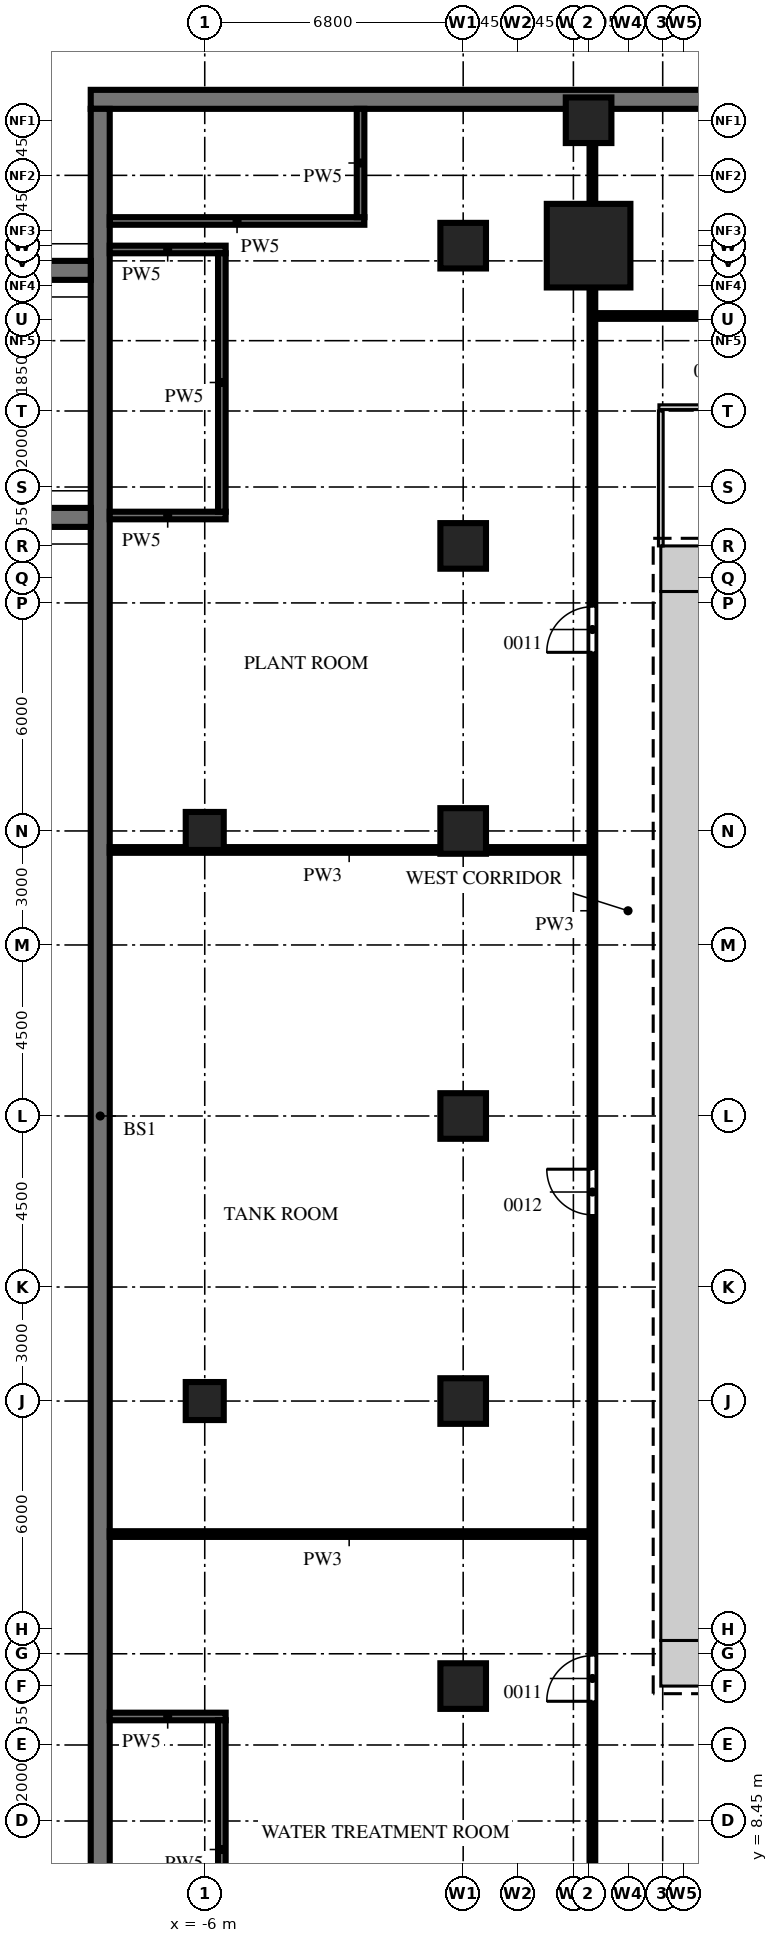
"""IFC4 building model, lengths in metres.
Left out: names, types, materials, properties, quantities, classifications, styles, units other than length and angle.
Written with IfcOpenShell. Run it as: python <this file> out.ifc"""

import sys

from ifc_helpers import new_model, si_unit, direction, frame, frame_2d, origin, origin_2d, place, context, subcontext, project, spatial, rectangle, extrude, source, transform, mapped, element, fill, save


model = new_model("IFC4")
c1 = context("Model", 3, precision=1e-05, world=origin(), true_north=direction((0.0, 1.0)))
c2 = subcontext(c1, "Body", "Model", "MODEL_VIEW")
j1 = project(units=[si_unit("LENGTHUNIT", "METRE"), si_unit("PLANEANGLEUNIT", "RADIAN")], contexts=[c1])
p1 = place(None, origin())
s1 = spatial("IfcSite", under=j1, at=p1, CompositionType="ELEMENT")
p2 = place(p1, origin())
s2 = spatial("IfcBuilding", under=s1, at=p2, CompositionType="ELEMENT")
p3 = place(p2, frame((0.0, 0.0, -9.0)))
s3 = spatial("IfcBuildingStorey", under=s2, at=p3, CompositionType="ELEMENT", Elevation=-9.0)
m1 = source(origin(), c2, "Body", "SweptSolid", [
    extrude(rectangle(XDim=1.2, YDim=1.2, at=frame_2d((0.6, 0.0))), origin(), (0.0, 0.0, 1.0), 4.2),
])
for number, where, z_axis, x_axis in (
    (1, (6.0, 41.4, 0.0), (0.0, 0.0, 1.0), (1.0, 0.0, 0.0)),
    (2, (6.0, 12.6, 0.0), (0.0, 0.0, 1.0), (1.0, 0.0, 0.0)),
):
    element("IfcWall", number, at=place(p3, frame(where, z_axis=z_axis, x_axis=x_axis)), inside=s3, PredefinedType="SHEAR", context=c2, shape_type="MappedRepresentation", body=[
        mapped(m1, transform((0.0, 0.0, 0.0))),
    ])
m2 = source(origin(), c2, "Body", "SweptSolid", [
    extrude(rectangle(XDim=27.6, YDim=1.2, at=frame_2d((13.8, 0.0))), origin(), (0.0, 0.0, 1.0), 4.2),
])
p4 = place(p3, frame((6.6, 13.2, 0.0), z_axis=(0.0, 0.0, 1.0), x_axis=(0.0, 1.0, 0.0)))
e3 = element("IfcWall", 3, at=p4, inside=s3, PredefinedType="SHEAR", context=c2, shape_type="MappedRepresentation", body=[
    mapped(m2, transform((0.0, 0.0, 0.0))),
])
m3 = source(origin(), c2, "Body", "SweptSolid", [
    extrude(rectangle(XDim=90.0, YDim=0.5, at=frame_2d((45.0, 0.0))), origin(), (0.0, 0.0, 1.0), 4.2),
])
p5 = place(p3, frame((-9.0, 53.75, 0.0), z_axis=(0.0, 0.0, 1.0), x_axis=(1.0, 0.0, 0.0)))
e4 = element("IfcWall", 4, at=p5, inside=s3, PredefinedType="STANDARD", context=c2, shape_type="MappedRepresentation", body=[
    mapped(m3, transform((0.0, 0.0, 0.0))),
])
m4 = source(origin(), c2, "Body", "SweptSolid", [
    extrude(rectangle(XDim=53.0, YDim=0.5, at=frame_2d((26.5, 0.0))), origin(), (0.0, 0.0, 1.0), 4.2),
])
p6 = place(p3, frame((-8.75, 0.5, 0.0), z_axis=(0.0, 0.0, 1.0), x_axis=(0.0, 1.0, 0.0)))
e5 = element("IfcWall", 5, at=p6, inside=s3, PredefinedType="STANDARD", context=c2, shape_type="MappedRepresentation", body=[
    mapped(m4, transform((0.0, 0.0, 0.0))),
])
m5 = source(origin(), c2, "Body", "SweptSolid", [
    extrude(rectangle(XDim=2.2, YDim=2.2, at=origin_2d()), origin(), (0.0, 0.0, 1.0), 4.5),
])
p7 = place(p3, frame((4.1, 49.9, 0.0), z_axis=(0.0, 0.0, 1.0), x_axis=(1.0, 0.0, 0.0)))
e6 = element("IfcColumn", 6, at=p7, inside=s3, PredefinedType="COLUMN", context=c2, shape_type="MappedRepresentation", body=[
    mapped(m5, transform((0.0, 0.0, 0.0))),
])
m6 = source(origin(), c2, "Body", "SweptSolid", [
    extrude(rectangle(XDim=1.2, YDim=1.2, at=origin_2d()), origin(), (0.0, 0.0, 1.0), 4.2),
])
for number, where, z_axis, x_axis in (
    (7, (4.1, 53.2, 0.0), (0.0, 0.0, 1.0), (1.0, 0.0, 0.0)),
    (8, (0.8, 12.0, 0.0), (0.0, 0.0, 1.0), (1.0, 0.0, 0.0)),
    (9, (0.8, 19.5, 0.0), (0.0, 0.0, 1.0), (1.0, 0.0, 0.0)),
    (10, (0.8, 27.0, 0.0), (0.0, 0.0, 1.0), (1.0, 0.0, 0.0)),
    (11, (0.8, 34.5, 0.0), (0.0, 0.0, 1.0), (1.0, 0.0, 0.0)),
    (12, (0.8, 42.0, 0.0), (0.0, 0.0, 1.0), (1.0, 0.0, 0.0)),
    (13, (0.8, 49.9, 0.0), (0.0, 0.0, 1.0), (1.0, 0.0, 0.0)),
):
    element("IfcColumn", number, at=place(p3, frame(where, z_axis=z_axis, x_axis=x_axis)), inside=s3, PredefinedType="COLUMN", context=c2, shape_type="MappedRepresentation", body=[
        mapped(m6, transform((0.0, 0.0, 0.0))),
    ])
m7 = source(origin(), c2, "Body", "SweptSolid", [
    extrude(rectangle(XDim=1.0, YDim=1.0, at=origin_2d()), origin(), (0.0, 0.0, 1.0), 4.2),
])
for number, where, z_axis, x_axis in (
    (14, (-6.0, 19.5, 0.0), (0.0, 0.0, 1.0), (1.0, 0.0, 0.0)),
    (15, (-6.0, 34.5, 0.0), (0.0, 0.0, 1.0), (1.0, 0.0, 0.0)),
):
    element("IfcColumn", number, at=place(p3, frame(where, z_axis=z_axis, x_axis=x_axis)), inside=s3, PredefinedType="COLUMN", context=c2, shape_type="MappedRepresentation", body=[
        mapped(m7, transform((0.0, 0.0, 0.0))),
    ])
m8 = source(origin(), c2, "Body", "SweptSolid", [
    extrude(rectangle(XDim=29.995, YDim=0.5, at=frame_2d((14.997, 0.0))), origin(), (0.0, 0.0, 1.0), 0.36),
])
for number, where, z_axis, x_axis in (
    (16, (-38.995, 42.75, 4.14), (0.0, 0.0, 1.0), (1.0, 0.0, 0.0)),
    (17, (-38.995, 49.25, 4.14), (0.0, 0.0, 1.0), (1.0, 0.0, 0.0)),
):
    element("IfcWall", number, at=place(p3, frame(where, z_axis=z_axis, x_axis=x_axis)), inside=s3, PredefinedType="SOLIDWALL", context=c2, shape_type="MappedRepresentation", body=[
        mapped(m8, transform((0.0, 0.0, 0.0))),
    ])
m9 = source(origin(), c2, "Body", "SweptSolid", [
    extrude(rectangle(XDim=53.0, YDim=0.15, at=frame_2d((26.5, 0.0))), origin(), (0.0, 0.0, 1.0), 4.2),
])
p8 = place(p3, frame((4.2, 0.5, 0.0), z_axis=(0.0, 0.0, 1.0), x_axis=(0.0, 1.0, 0.0)))
e18 = element("IfcWall", 18, at=p8, inside=s3, PredefinedType="PARTITIONING", context=c2, shape_type="MappedRepresentation", body=[
    mapped(m9, transform((0.0, 0.0, 0.0))),
])
m10 = source(origin(), c2, "Body", "SweptSolid", [
    extrude(rectangle(XDim=1.2, YDim=2.1, at=frame_2d((0.6, 1.05))), frame((0.0, 0.085, 0.0), z_axis=(0.0, -1.0, 0.0), x_axis=(1.0, 0.0, 0.0)), (0.0, 0.0, 1.0), 0.17),
])
p9 = place(p8, frame((11.1, 0.0, 0.0)))
e19 = element("IfcOpeningElement", 19, at=p9, cuts=e18, PredefinedType="OPENING", context=c2, shape_type="MappedRepresentation", body=[
    mapped(m10, transform((0.0, 0.0, 0.0))),
])
p10 = place(p8, frame((23.9, 0.0, 0.0)))
e20 = element("IfcOpeningElement", 20, at=p10, cuts=e18, PredefinedType="OPENING", context=c2, shape_type="MappedRepresentation", body=[
    mapped(m10, transform((0.0, 0.0, 0.0))),
])
p11 = place(p8, frame((38.7, 0.0, 0.0)))
e21 = element("IfcOpeningElement", 21, at=p11, cuts=e18, PredefinedType="OPENING", context=c2, shape_type="MappedRepresentation", body=[
    mapped(m10, transform((0.0, 0.0, 0.0))),
])
m11 = source(origin(), c2, "Body", "SweptSolid", [
    extrude(rectangle(XDim=12.6, YDim=0.15, at=frame_2d((6.3, 0.0))), origin(), (0.0, 0.0, 1.0), 4.2),
])
for number, where, z_axis, x_axis in (
    (22, (-8.5, 16.0, 0.0), (0.0, 0.0, 1.0), (1.0, 0.0, 0.0)),
    (23, (-8.5, 34.0, 0.0), (0.0, 0.0, 1.0), (1.0, 0.0, 0.0)),
):
    element("IfcWall", number, at=place(p3, frame(where, z_axis=z_axis, x_axis=x_axis)), inside=s3, PredefinedType="PARTITIONING", context=c2, shape_type="MappedRepresentation", body=[
        mapped(m11, transform((0.0, 0.0, 0.0))),
    ])
m12 = source(origin(), c2, "Body", "SweptSolid", [
    extrude(rectangle(XDim=3.55, YDim=0.125, at=frame_2d((1.775, 0.0))), origin(), (0.0, 0.0, 1.0), 4.2),
])
p12 = place(p3, frame((6.0, 42.0, 0.0), z_axis=(0.0, 0.0, 1.0), x_axis=(0.0, 1.0, 0.0)))
e24 = element("IfcWall", 24, at=p12, inside=s3, PredefinedType="PARTITIONING", context=c2, shape_type="MappedRepresentation", body=[
    mapped(m12, transform((0.0, 0.0, 0.0))),
])
m13 = source(origin(), c2, "Body", "SweptSolid", [
    extrude(rectangle(XDim=7.95, YDim=0.125, at=frame_2d((3.975, 0.0))), origin(), (0.0, 0.0, 1.0), 4.2),
])
p13 = place(p3, frame((5.95, 45.65, 0.0), z_axis=(0.0, 0.0, 1.0), x_axis=(1.0, 0.0, 0.0)))
e25 = element("IfcWall", 25, at=p13, inside=s3, PredefinedType="PARTITIONING", context=c2, shape_type="MappedRepresentation", body=[
    mapped(m13, transform((0.0, 0.0, 0.0))),
])
m14 = source(origin(), c2, "Body", "SweptSolid", [
    extrude(rectangle(XDim=0.9, YDim=2.1, at=frame_2d((0.45, 1.05))), frame((0.0, 0.073, 0.0), z_axis=(0.0, -1.0, 0.0), x_axis=(1.0, 0.0, 0.0)), (0.0, 0.0, 1.0), 0.145),
])
p14 = place(p13, frame((3.55, 0.0, 0.0)))
e26 = element("IfcOpeningElement", 26, at=p14, cuts=e25, PredefinedType="OPENING", context=c2, shape_type="MappedRepresentation", body=[
    mapped(m14, transform((0.0, 0.0, 0.0))),
])
m15 = source(origin(), c2, "Body", "SweptSolid", [
    extrude(rectangle(XDim=26.45, YDim=0.15, at=frame_2d((13.225, 0.0))), origin(), (0.0, 0.0, 1.0), 4.2),
])
p15 = place(p3, frame((4.3, 48.05, 0.0), z_axis=(0.0, 0.0, 1.0), x_axis=(1.0, 0.0, 0.0)))
e27 = element("IfcWall", 27, at=p15, inside=s3, PredefinedType="PARTITIONING", context=c2, shape_type="MappedRepresentation", body=[
    mapped(m15, transform((0.0, 0.0, 0.0))),
])
m16 = source(origin(), c2, "Body", "SweptSolid", [
    extrude(rectangle(XDim=0.9, YDim=2.1, at=frame_2d((0.45, 1.05))), frame((0.0, 0.085, 0.0), z_axis=(0.0, -1.0, 0.0), x_axis=(1.0, 0.0, 0.0)), (0.0, 0.0, 1.0), 0.17),
])
p16 = place(p15, frame((3.35, 0.0, 0.0)))
e28 = element("IfcOpeningElement", 28, at=p16, cuts=e27, PredefinedType="OPENING", context=c2, shape_type="MappedRepresentation", body=[
    mapped(m16, transform((0.0, 0.0, 0.0))),
])
p17 = place(p15, frame((16.6, 0.0, 0.0)))
e29 = element("IfcOpeningElement", 29, at=p17, cuts=e27, PredefinedType="OPENING", context=c2, shape_type="MappedRepresentation", body=[
    mapped(m16, transform((0.0, 0.0, 0.0))),
])
m17 = source(origin(), c2, "Body", "SweptSolid", [
    extrude(rectangle(XDim=3.05, YDim=0.2, at=frame_2d((1.525, 0.0))), origin(), (0.0, 0.0, 1.0), 4.2),
])
p18 = place(p3, frame((-8.5, 11.2, 0.0), z_axis=(0.0, 0.0, 1.0), x_axis=(1.0, 0.0, 0.0)))
e30 = element("IfcWall", 30, at=p18, inside=s3, PredefinedType="PARTITIONING", context=c2, shape_type="MappedRepresentation", body=[
    mapped(m17, transform((0.0, 0.0, 0.0))),
])
m18 = source(origin(), c2, "Body", "SweptSolid", [
    extrude(rectangle(XDim=6.8, YDim=0.2, at=frame_2d((3.4, 0.0))), origin(), (0.0, 0.0, 1.0), 4.2),
])
p19 = place(p3, frame((-5.55, 4.3, 0.0), z_axis=(0.0, 0.0, 1.0), x_axis=(0.0, 1.0, 0.0)))
e31 = element("IfcWall", 31, at=p19, inside=s3, PredefinedType="PARTITIONING", context=c2, shape_type="MappedRepresentation", body=[
    mapped(m18, transform((0.0, 0.0, 0.0))),
])
m19 = source(origin(), c2, "Body", "SweptSolid", [
    extrude(rectangle(XDim=6.7, YDim=0.2, at=frame_2d((3.35, 0.0))), origin(), (0.0, 0.0, 1.0), 4.2),
])
p20 = place(p3, frame((-8.5, 50.55, 0.0), z_axis=(0.0, 0.0, 1.0), x_axis=(1.0, 0.0, 0.0)))
e32 = element("IfcWall", 32, at=p20, inside=s3, PredefinedType="PARTITIONING", context=c2, shape_type="MappedRepresentation", body=[
    mapped(m19, transform((0.0, 0.0, 0.0))),
])
m20 = source(origin(), c2, "Body", "SweptSolid", [
    extrude(rectangle(XDim=2.85, YDim=0.2, at=frame_2d((1.425, 0.0))), origin(), (0.0, 0.0, 1.0), 4.2),
])
p21 = place(p3, frame((-1.9, 50.65, 0.0), z_axis=(0.0, 0.0, 1.0), x_axis=(0.0, 1.0, 0.0)))
e33 = element("IfcWall", 33, at=p21, inside=s3, PredefinedType="PARTITIONING", context=c2, shape_type="MappedRepresentation", body=[
    mapped(m20, transform((0.0, 0.0, 0.0))),
])
for number, where, z_axis, x_axis in (
    (34, (-8.5, 42.8, 0.0), (0.0, 0.0, 1.0), (1.0, 0.0, 0.0)),
    (35, (-8.5, 49.8, 0.0), (0.0, 0.0, 1.0), (1.0, 0.0, 0.0)),
):
    element("IfcWall", number, at=place(p3, frame(where, z_axis=z_axis, x_axis=x_axis)), inside=s3, PredefinedType="PARTITIONING", context=c2, shape_type="MappedRepresentation", body=[
        mapped(m17, transform((0.0, 0.0, 0.0))),
    ])
p22 = place(p3, frame((-5.55, 42.9, 0.0), z_axis=(0.0, 0.0, 1.0), x_axis=(0.0, 1.0, 0.0)))
e36 = element("IfcWall", 36, at=p22, inside=s3, PredefinedType="PARTITIONING", context=c2, shape_type="MappedRepresentation", body=[
    mapped(m18, transform((0.0, 0.0, 0.0))),
])
m21 = source(origin(), c2, "Body", "SweptSolid", [
    extrude(rectangle(XDim=1.2, YDim=2.1, at=frame_2d((0.6, 1.05))), frame((0.0, 0.025, 0.0), z_axis=(0.0, -1.0, 0.0), x_axis=(1.0, 0.0, 0.0)), (0.0, 0.0, 1.0), 0.05),
])
p23 = place(p9, origin())
e37 = element("IfcDoor", 37, at=p23, inside=s3, OperationType="SINGLE_SWING_RIGHT", PredefinedType="DOOR", context=c2, shape_type="MappedRepresentation", body=[
    mapped(m21, transform((0.0, 0.0, 0.0))),
])
fill(e19, e37)
p24 = place(p10, origin())
e38 = element("IfcDoor", 38, at=p24, inside=s3, OperationType="SINGLE_SWING_LEFT", PredefinedType="DOOR", context=c2, shape_type="MappedRepresentation", body=[
    mapped(m21, transform((0.0, 0.0, 0.0))),
])
fill(e20, e38)
p25 = place(p11, origin())
e39 = element("IfcDoor", 39, at=p25, inside=s3, OperationType="SINGLE_SWING_RIGHT", PredefinedType="DOOR", context=c2, shape_type="MappedRepresentation", body=[
    mapped(m21, transform((0.0, 0.0, 0.0))),
])
fill(e21, e39)
save(model, sys.argv[1])
